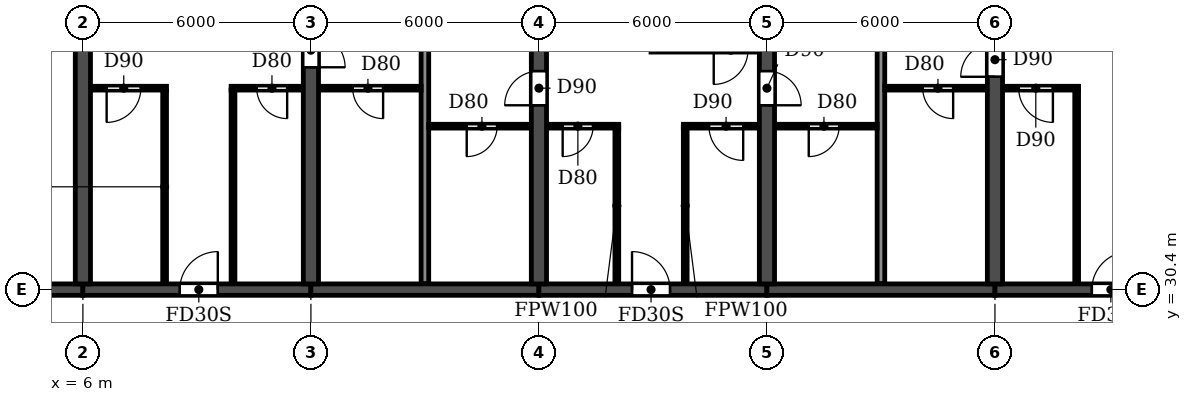
"""IFC4 building model, lengths in metres.
Left out: names, types, materials, properties, quantities, classifications, styles, units other than length and angle.
Written with IfcOpenShell. Run it as: python <this file> out.ifc"""

import sys

from ifc_helpers import new_model, si_unit, direction, frame, frame_2d, origin, place, context, subcontext, project, spatial, rectangle, extrude, element, fill, save


model = new_model("IFC4")
c1 = context("Model", 3, precision=1e-05, world=origin(), true_north=direction((0.0, 1.0)))
c2 = subcontext(c1, "Body", "Model", "MODEL_VIEW")
j1 = project(units=[si_unit("LENGTHUNIT", "METRE"), si_unit("PLANEANGLEUNIT", "RADIAN")], contexts=[c1])
p1 = place(None, origin())
s1 = spatial("IfcSite", under=j1, at=p1, CompositionType="ELEMENT")
p2 = place(p1, origin())
s2 = spatial("IfcBuilding", under=s1, at=p2, CompositionType="ELEMENT")
p3 = place(p2, frame((0.0, 0.0, 23.4)))
s3 = spatial("IfcBuildingStorey", under=s2, at=p3, CompositionType="ELEMENT", Elevation=23.4)
p4 = place(p3, frame((6.0, 30.55, 0.0), z_axis=(0.0, 0.0, 1.0), x_axis=(0.0, 1.0, 0.0)))
e1 = element("IfcWall", 1, at=p4, inside=s3, PredefinedType="SHEAR", context=c2, shape_type="SweptSolid", body=[
    extrude(rectangle(XDim=14.05, YDim=0.4, at=frame_2d((7.025, 0.0))), origin(), (0.0, 0.0, 1.0), 3.05),
])
p5 = place(p3, frame((12.0, 30.55, 0.0), z_axis=(0.0, 0.0, 1.0), x_axis=(0.0, 1.0, 0.0)))
e2 = element("IfcWall", 2, at=p5, inside=s3, PredefinedType="SHEAR", context=c2, shape_type="SweptSolid", body=[
    extrude(rectangle(XDim=14.05, YDim=0.4, at=frame_2d((7.025, 0.0))), origin(), (0.0, 0.0, 1.0), 3.05),
])
p6 = place(p5, frame((5.7, 0.0, 0.0)))
e3 = element("IfcOpeningElement", 3, at=p6, cuts=e2, PredefinedType="OPENING", context=c2, shape_type="SweptSolid", body=[
    extrude(rectangle(XDim=0.9, YDim=2.1, at=frame_2d((0.45, 1.05))), frame((0.0, 0.21, 0.0), z_axis=(0.0, -1.0, 0.0), x_axis=(1.0, 0.0, 0.0)), (0.0, 0.0, 1.0), 0.42),
])
p7 = place(p3, frame((18.0, 30.55, 0.0), z_axis=(0.0, 0.0, 1.0), x_axis=(0.0, 1.0, 0.0)))
e4 = element("IfcWall", 4, at=p7, inside=s3, PredefinedType="SHEAR", context=c2, shape_type="SweptSolid", body=[
    extrude(rectangle(XDim=14.05, YDim=0.4, at=frame_2d((7.025, 0.0))), origin(), (0.0, 0.0, 1.0), 3.05),
])
p8 = place(p7, frame((4.7, 0.0, 0.0)))
e5 = element("IfcOpeningElement", 5, at=p8, cuts=e4, PredefinedType="OPENING", context=c2, shape_type="SweptSolid", body=[
    extrude(rectangle(XDim=0.9, YDim=2.1, at=frame_2d((0.45, 1.05))), frame((0.0, 0.21, 0.0), z_axis=(0.0, -1.0, 0.0), x_axis=(1.0, 0.0, 0.0)), (0.0, 0.0, 1.0), 0.42),
])
p9 = place(p3, frame((24.0, 30.55, 0.0), z_axis=(0.0, 0.0, 1.0), x_axis=(0.0, 1.0, 0.0)))
e6 = element("IfcWall", 6, at=p9, inside=s3, PredefinedType="SHEAR", context=c2, shape_type="SweptSolid", body=[
    extrude(rectangle(XDim=14.05, YDim=0.4, at=frame_2d((7.025, 0.0))), origin(), (0.0, 0.0, 1.0), 3.05),
])
p10 = place(p9, frame((4.7, 0.0, 0.0)))
e7 = element("IfcOpeningElement", 7, at=p10, cuts=e6, PredefinedType="OPENING", context=c2, shape_type="SweptSolid", body=[
    extrude(rectangle(XDim=0.9, YDim=2.1, at=frame_2d((0.45, 1.05))), frame((0.0, 0.21, 0.0), z_axis=(0.0, -1.0, 0.0), x_axis=(1.0, 0.0, 0.0)), (0.0, 0.0, 1.0), 0.42),
])
p11 = place(p3, frame((30.0, 30.55, 0.0), z_axis=(0.0, 0.0, 1.0), x_axis=(0.0, 1.0, 0.0)))
e8 = element("IfcWall", 8, at=p11, inside=s3, PredefinedType="SHEAR", context=c2, shape_type="SweptSolid", body=[
    extrude(rectangle(XDim=14.05, YDim=0.4, at=frame_2d((7.025, 0.0))), origin(), (0.0, 0.0, 1.0), 3.05),
])
p12 = place(p11, frame((5.45, 0.0, 0.0)))
e9 = element("IfcOpeningElement", 9, at=p12, cuts=e8, PredefinedType="OPENING", context=c2, shape_type="SweptSolid", body=[
    extrude(rectangle(XDim=0.9, YDim=2.1, at=frame_2d((0.45, 1.05))), frame((0.0, 0.21, 0.0), z_axis=(0.0, -1.0, 0.0), x_axis=(1.0, 0.0, 0.0)), (0.0, 0.0, 1.0), 0.42),
])
p13 = place(p3, frame((0.2, 30.4, 0.0), z_axis=(0.0, 0.0, 1.0), x_axis=(1.0, 0.0, 0.0)))
e10 = element("IfcWall", 10, at=p13, inside=s3, PredefinedType="SHEAR", context=c2, shape_type="SweptSolid", body=[
    extrude(rectangle(XDim=5.8, YDim=0.3, at=frame_2d((2.9, 0.0))), origin(), (0.0, 0.0, 1.0), 2.45),
])
p14 = place(p13, frame((2.3, 0.0, 0.0)))
e11 = element("IfcOpeningElement", 11, at=p14, cuts=e10, PredefinedType="OPENING", context=c2, shape_type="SweptSolid", body=[
    extrude(rectangle(XDim=1.0, YDim=2.1, at=frame_2d((0.5, 1.05))), frame((0.0, 0.16, 0.0), z_axis=(0.0, -1.0, 0.0), x_axis=(1.0, 0.0, 0.0)), (0.0, 0.0, 1.0), 0.32),
])
p15 = place(p3, frame((6.0, 30.4, 0.0), z_axis=(0.0, 0.0, 1.0), x_axis=(1.0, 0.0, 0.0)))
e12 = element("IfcWall", 12, at=p15, inside=s3, PredefinedType="SHEAR", context=c2, shape_type="SweptSolid", body=[
    extrude(rectangle(XDim=6.0, YDim=0.3, at=frame_2d((3.0, 0.0))), origin(), (0.0, 0.0, 1.0), 2.45),
])
p16 = place(p15, frame((2.55, 0.0, 0.0)))
e13 = element("IfcOpeningElement", 13, at=p16, cuts=e12, PredefinedType="OPENING", context=c2, shape_type="SweptSolid", body=[
    extrude(rectangle(XDim=1.0, YDim=2.1, at=frame_2d((0.5, 1.05))), frame((0.0, 0.16, 0.0), z_axis=(0.0, -1.0, 0.0), x_axis=(1.0, 0.0, 0.0)), (0.0, 0.0, 1.0), 0.32),
])
p17 = place(p3, frame((12.0, 30.4, 0.0), z_axis=(0.0, 0.0, 1.0), x_axis=(1.0, 0.0, 0.0)))
e14 = element("IfcWall", 14, at=p17, inside=s3, PredefinedType="SHEAR", context=c2, shape_type="SweptSolid", body=[
    extrude(rectangle(XDim=6.0, YDim=0.3, at=frame_2d((3.0, 0.0))), origin(), (0.0, 0.0, 1.0), 2.45),
])
p18 = place(p3, frame((18.0, 30.4, 0.0), z_axis=(0.0, 0.0, 1.0), x_axis=(1.0, 0.0, 0.0)))
e15 = element("IfcWall", 15, at=p18, inside=s3, PredefinedType="SHEAR", context=c2, shape_type="SweptSolid", body=[
    extrude(rectangle(XDim=6.0, YDim=0.3, at=frame_2d((3.0, 0.0))), origin(), (0.0, 0.0, 1.0), 2.45),
])
p19 = place(p18, frame((2.45, 0.0, 0.0)))
e16 = element("IfcOpeningElement", 16, at=p19, cuts=e15, PredefinedType="OPENING", context=c2, shape_type="SweptSolid", body=[
    extrude(rectangle(XDim=1.0, YDim=2.1, at=frame_2d((0.5, 1.05))), frame((0.0, 0.16, 0.0), z_axis=(0.0, -1.0, 0.0), x_axis=(1.0, 0.0, 0.0)), (0.0, 0.0, 1.0), 0.32),
])
p20 = place(p3, frame((24.0, 30.4, 0.0), z_axis=(0.0, 0.0, 1.0), x_axis=(1.0, 0.0, 0.0)))
e17 = element("IfcWall", 17, at=p20, inside=s3, PredefinedType="SHEAR", context=c2, shape_type="SweptSolid", body=[
    extrude(rectangle(XDim=6.0, YDim=0.3, at=frame_2d((3.0, 0.0))), origin(), (0.0, 0.0, 1.0), 2.45),
])
p21 = place(p3, frame((30.0, 30.4, 0.0), z_axis=(0.0, 0.0, 1.0), x_axis=(1.0, 0.0, 0.0)))
e18 = element("IfcWall", 18, at=p21, inside=s3, PredefinedType="SHEAR", context=c2, shape_type="SweptSolid", body=[
    extrude(rectangle(XDim=6.0, YDim=0.3, at=frame_2d((3.0, 0.0))), origin(), (0.0, 0.0, 1.0), 2.45),
])
p22 = place(p21, frame((2.55, 0.0, 0.0)))
e19 = element("IfcOpeningElement", 19, at=p22, cuts=e18, PredefinedType="OPENING", context=c2, shape_type="SweptSolid", body=[
    extrude(rectangle(XDim=1.0, YDim=2.1, at=frame_2d((0.5, 1.05))), frame((0.0, 0.16, 0.0), z_axis=(0.0, -1.0, 0.0), x_axis=(1.0, 0.0, 0.0)), (0.0, 0.0, 1.0), 0.32),
])
for number, where, z_axis, x_axis in (
    (20, (15.0, 30.56, 0.0), (0.0, 0.0, 1.0), (0.0, 1.0, 0.0)),
    (21, (27.0, 30.56, 0.0), (0.0, 0.0, 1.0), (0.0, 1.0, 0.0)),
):
    element("IfcWall", number, at=place(p3, frame(where, z_axis=z_axis, x_axis=x_axis)), inside=s3, PredefinedType="PARTITIONING", context=c2, shape_type="SweptSolid", body=[
        extrude(rectangle(XDim=14.18, YDim=0.2, at=frame_2d((7.09, 0.0))), origin(), (0.0, 0.0, 1.0), 3.05),
    ])
p23 = place(p3, frame((15.1, 34.7, 0.0), z_axis=(0.0, 0.0, 1.0), x_axis=(1.0, 0.0, 0.0)))
e22 = element("IfcWall", 22, at=p23, inside=s3, PredefinedType="PARTITIONING", context=c2, shape_type="SweptSolid", body=[
    extrude(rectangle(XDim=2.69, YDim=0.1, at=frame_2d((1.345, 0.0))), origin(), (0.0, 0.0, 1.0), 3.05),
])
p24 = place(p23, frame((1.0, 0.0, 0.0)))
e23 = element("IfcOpeningElement", 23, at=p24, cuts=e22, PredefinedType="OPENING", context=c2, shape_type="SweptSolid", body=[
    extrude(rectangle(XDim=0.8, YDim=2.1, at=frame_2d((0.4, 1.05))), frame((0.0, 0.06, 0.0), z_axis=(0.0, -1.0, 0.0), x_axis=(1.0, 0.0, 0.0)), (0.0, 0.0, 1.0), 0.12),
])
p25 = place(p3, frame((18.21, 34.7, 0.0), z_axis=(0.0, 0.0, 1.0), x_axis=(1.0, 0.0, 0.0)))
e24 = element("IfcWall", 24, at=p25, inside=s3, PredefinedType="PARTITIONING", context=c2, shape_type="SweptSolid", body=[
    extrude(rectangle(XDim=1.89, YDim=0.1, at=frame_2d((0.945, 0.0))), origin(), (0.0, 0.0, 1.0), 3.05),
])
p26 = place(p25, frame((0.415, 0.0, 0.0)))
e25 = element("IfcOpeningElement", 25, at=p26, cuts=e24, PredefinedType="OPENING", context=c2, shape_type="SweptSolid", body=[
    extrude(rectangle(XDim=0.8, YDim=2.1, at=frame_2d((0.4, 1.05))), frame((0.0, 0.06, 0.0), z_axis=(0.0, -1.0, 0.0), x_axis=(1.0, 0.0, 0.0)), (0.0, 0.0, 1.0), 0.12),
])
p27 = place(p3, frame((21.8, 34.7, 0.0), z_axis=(0.0, 0.0, 1.0), x_axis=(1.0, 0.0, 0.0)))
e26 = element("IfcWall", 26, at=p27, inside=s3, PredefinedType="PARTITIONING", context=c2, shape_type="SweptSolid", body=[
    extrude(rectangle(XDim=1.99, YDim=0.1, at=frame_2d((0.995, 0.0))), origin(), (0.0, 0.0, 1.0), 3.05),
])
p28 = place(p27, frame((0.675, 0.0, 0.0)))
e27 = element("IfcOpeningElement", 27, at=p28, cuts=e26, PredefinedType="OPENING", context=c2, shape_type="SweptSolid", body=[
    extrude(rectangle(XDim=0.9, YDim=2.1, at=frame_2d((0.45, 1.05))), frame((0.0, 0.06, 0.0), z_axis=(0.0, -1.0, 0.0), x_axis=(1.0, 0.0, 0.0)), (0.0, 0.0, 1.0), 0.12),
])
p29 = place(p3, frame((24.21, 34.7, 0.0), z_axis=(0.0, 0.0, 1.0), x_axis=(1.0, 0.0, 0.0)))
e28 = element("IfcWall", 28, at=p29, inside=s3, PredefinedType="PARTITIONING", context=c2, shape_type="SweptSolid", body=[
    extrude(rectangle(XDim=2.69, YDim=0.1, at=frame_2d((1.345, 0.0))), origin(), (0.0, 0.0, 1.0), 3.05),
])
p30 = place(p29, frame((0.89, 0.0, 0.0)))
e29 = element("IfcOpeningElement", 29, at=p30, cuts=e28, PredefinedType="OPENING", context=c2, shape_type="SweptSolid", body=[
    extrude(rectangle(XDim=0.8, YDim=2.1, at=frame_2d((0.4, 1.05))), frame((0.0, 0.06, 0.0), z_axis=(0.0, -1.0, 0.0), x_axis=(1.0, 0.0, 0.0)), (0.0, 0.0, 1.0), 0.12),
])
p31 = place(p3, frame((6.21, 35.7, 0.0), z_axis=(0.0, 0.0, 1.0), x_axis=(1.0, 0.0, 0.0)))
e30 = element("IfcWall", 30, at=p31, inside=s3, PredefinedType="PARTITIONING", context=c2, shape_type="SweptSolid", body=[
    extrude(rectangle(XDim=1.99, YDim=0.1, at=frame_2d((0.995, 0.0))), origin(), (0.0, 0.0, 1.0), 3.05),
])
p32 = place(p31, frame((0.415, 0.0, 0.0)))
e31 = element("IfcOpeningElement", 31, at=p32, cuts=e30, PredefinedType="OPENING", context=c2, shape_type="SweptSolid", body=[
    extrude(rectangle(XDim=0.9, YDim=2.1, at=frame_2d((0.45, 1.05))), frame((0.0, 0.06, 0.0), z_axis=(0.0, -1.0, 0.0), x_axis=(1.0, 0.0, 0.0)), (0.0, 0.0, 1.0), 0.12),
])
p33 = place(p3, frame((9.9, 35.7, 0.0), z_axis=(0.0, 0.0, 1.0), x_axis=(1.0, 0.0, 0.0)))
e32 = element("IfcWall", 32, at=p33, inside=s3, PredefinedType="PARTITIONING", context=c2, shape_type="SweptSolid", body=[
    extrude(rectangle(XDim=1.89, YDim=0.1, at=frame_2d((0.945, 0.0))), origin(), (0.0, 0.0, 1.0), 3.05),
])
p34 = place(p33, frame((0.675, 0.0, 0.0)))
e33 = element("IfcOpeningElement", 33, at=p34, cuts=e32, PredefinedType="OPENING", context=c2, shape_type="SweptSolid", body=[
    extrude(rectangle(XDim=0.8, YDim=2.1, at=frame_2d((0.4, 1.05))), frame((0.0, 0.06, 0.0), z_axis=(0.0, -1.0, 0.0), x_axis=(1.0, 0.0, 0.0)), (0.0, 0.0, 1.0), 0.12),
])
p35 = place(p3, frame((12.21, 35.7, 0.0), z_axis=(0.0, 0.0, 1.0), x_axis=(1.0, 0.0, 0.0)))
e34 = element("IfcWall", 34, at=p35, inside=s3, PredefinedType="PARTITIONING", context=c2, shape_type="SweptSolid", body=[
    extrude(rectangle(XDim=2.69, YDim=0.1, at=frame_2d((1.345, 0.0))), origin(), (0.0, 0.0, 1.0), 3.05),
])
p36 = place(p35, frame((0.89, 0.0, 0.0)))
e35 = element("IfcOpeningElement", 35, at=p36, cuts=e34, PredefinedType="OPENING", context=c2, shape_type="SweptSolid", body=[
    extrude(rectangle(XDim=0.8, YDim=2.1, at=frame_2d((0.4, 1.05))), frame((0.0, 0.06, 0.0), z_axis=(0.0, -1.0, 0.0), x_axis=(1.0, 0.0, 0.0)), (0.0, 0.0, 1.0), 0.12),
])
p37 = place(p3, frame((27.1, 35.7, 0.0), z_axis=(0.0, 0.0, 1.0), x_axis=(1.0, 0.0, 0.0)))
e36 = element("IfcWall", 36, at=p37, inside=s3, PredefinedType="PARTITIONING", context=c2, shape_type="SweptSolid", body=[
    extrude(rectangle(XDim=2.69, YDim=0.1, at=frame_2d((1.345, 0.0))), origin(), (0.0, 0.0, 1.0), 3.05),
])
p38 = place(p37, frame((1.0, 0.0, 0.0)))
e37 = element("IfcOpeningElement", 37, at=p38, cuts=e36, PredefinedType="OPENING", context=c2, shape_type="SweptSolid", body=[
    extrude(rectangle(XDim=0.8, YDim=2.1, at=frame_2d((0.4, 1.05))), frame((0.0, 0.06, 0.0), z_axis=(0.0, -1.0, 0.0), x_axis=(1.0, 0.0, 0.0)), (0.0, 0.0, 1.0), 0.12),
])
p39 = place(p3, frame((30.21, 35.7, 0.0), z_axis=(0.0, 0.0, 1.0), x_axis=(1.0, 0.0, 0.0)))
e38 = element("IfcWall", 38, at=p39, inside=s3, PredefinedType="PARTITIONING", context=c2, shape_type="SweptSolid", body=[
    extrude(rectangle(XDim=1.99, YDim=0.1, at=frame_2d((0.995, 0.0))), origin(), (0.0, 0.0, 1.0), 3.05),
])
p40 = place(p39, frame((0.415, 0.0, 0.0)))
e39 = element("IfcOpeningElement", 39, at=p40, cuts=e38, PredefinedType="OPENING", context=c2, shape_type="SweptSolid", body=[
    extrude(rectangle(XDim=0.9, YDim=2.1, at=frame_2d((0.45, 1.05))), frame((0.0, 0.06, 0.0), z_axis=(0.0, -1.0, 0.0), x_axis=(1.0, 0.0, 0.0)), (0.0, 0.0, 1.0), 0.12),
])
for number, where, z_axis, x_axis in (
    (40, (8.15, 30.56, 0.0), (0.0, 0.0, 1.0), (0.0, 1.0, 0.0)),
    (41, (9.95, 30.56, 0.0), (0.0, 0.0, 1.0), (0.0, 1.0, 0.0)),
):
    element("IfcWall", number, at=place(p3, frame(where, z_axis=z_axis, x_axis=x_axis)), inside=s3, PredefinedType="PARTITIONING", context=c2, shape_type="SweptSolid", body=[
        extrude(rectangle(XDim=5.09, YDim=0.1, at=frame_2d((2.545, 0.0))), origin(), (0.0, 0.0, 1.0), 3.05),
    ])
for number, where, z_axis, x_axis in (
    (42, (20.05, 30.56, 0.0), (0.0, 0.0, 1.0), (0.0, 1.0, 0.0)),
    (43, (21.85, 30.56, 0.0), (0.0, 0.0, 1.0), (0.0, 1.0, 0.0)),
):
    element("IfcWall", number, at=place(p3, frame(where, z_axis=z_axis, x_axis=x_axis)), inside=s3, PredefinedType="PARTITIONING", context=c2, shape_type="SweptSolid", body=[
        extrude(rectangle(XDim=4.09, YDim=0.1, at=frame_2d((2.045, 0.0))), origin(), (0.0, 0.0, 1.0), 3.05),
    ])
p41 = place(p3, frame((32.15, 30.56, 0.0), z_axis=(0.0, 0.0, 1.0), x_axis=(0.0, 1.0, 0.0)))
e44 = element("IfcWall", 44, at=p41, inside=s3, PredefinedType="PARTITIONING", context=c2, shape_type="SweptSolid", body=[
    extrude(rectangle(XDim=5.09, YDim=0.1, at=frame_2d((2.545, 0.0))), origin(), (0.0, 0.0, 1.0), 3.05),
])
p42 = place(p36, frame((0.8, 0.0, 0.0), z_axis=(0.0, 0.0, 1.0), x_axis=(-1.0, 0.0, 0.0)))
e45 = element("IfcDoor", 45, at=p42, inside=s3, OperationType="SINGLE_SWING_LEFT", PredefinedType="DOOR", context=c2, shape_type="SweptSolid", body=[
    extrude(rectangle(XDim=0.8, YDim=2.1, at=frame_2d((0.4, 1.05))), frame((0.0, 0.025, 0.0), z_axis=(0.0, -1.0, 0.0), x_axis=(1.0, 0.0, 0.0)), (0.0, 0.0, 1.0), 0.05),
])
fill(e35, e45)
p43 = place(p32, frame((0.9, 0.0, 0.0), z_axis=(0.0, 0.0, 1.0), x_axis=(-1.0, 0.0, 0.0)))
e46 = element("IfcDoor", 46, at=p43, inside=s3, OperationType="SINGLE_SWING_RIGHT", PredefinedType="DOOR", context=c2, shape_type="SweptSolid", body=[
    extrude(rectangle(XDim=0.9, YDim=2.1, at=frame_2d((0.45, 1.05))), frame((0.0, 0.025, 0.0), z_axis=(0.0, -1.0, 0.0), x_axis=(1.0, 0.0, 0.0)), (0.0, 0.0, 1.0), 0.05),
])
fill(e31, e46)
p44 = place(p16, origin())
e47 = element("IfcDoor", 47, at=p44, inside=s3, OperationType="SINGLE_SWING_RIGHT", PredefinedType="DOOR", context=c2, shape_type="SweptSolid", body=[
    extrude(rectangle(XDim=1.0, YDim=2.1, at=frame_2d((0.5, 1.05))), frame((0.0, 0.025, 0.0), z_axis=(0.0, -1.0, 0.0), x_axis=(1.0, 0.0, 0.0)), (0.0, 0.0, 1.0), 0.05),
])
fill(e13, e47)
p45 = place(p34, frame((0.8, 0.0, 0.0), z_axis=(0.0, 0.0, 1.0), x_axis=(-1.0, 0.0, 0.0)))
e48 = element("IfcDoor", 48, at=p45, inside=s3, OperationType="SINGLE_SWING_LEFT", PredefinedType="DOOR", context=c2, shape_type="SweptSolid", body=[
    extrude(rectangle(XDim=0.8, YDim=2.1, at=frame_2d((0.4, 1.05))), frame((0.0, 0.025, 0.0), z_axis=(0.0, -1.0, 0.0), x_axis=(1.0, 0.0, 0.0)), (0.0, 0.0, 1.0), 0.05),
])
fill(e33, e48)
p46 = place(p6, frame((0.9, 0.0, 0.0), z_axis=(0.0, 0.0, 1.0), x_axis=(-1.0, 0.0, 0.0)))
e49 = element("IfcDoor", 49, at=p46, inside=s3, OperationType="SINGLE_SWING_RIGHT", PredefinedType="DOOR", context=c2, shape_type="SweptSolid", body=[
    extrude(rectangle(XDim=0.9, YDim=2.1, at=frame_2d((0.45, 1.05))), frame((0.0, 0.025, 0.0), z_axis=(0.0, -1.0, 0.0), x_axis=(1.0, 0.0, 0.0)), (0.0, 0.0, 1.0), 0.05),
])
fill(e3, e49)
p47 = place(p24, frame((0.8, 0.0, 0.0), z_axis=(0.0, 0.0, 1.0), x_axis=(-1.0, 0.0, 0.0)))
e50 = element("IfcDoor", 50, at=p47, inside=s3, OperationType="SINGLE_SWING_RIGHT", PredefinedType="DOOR", context=c2, shape_type="SweptSolid", body=[
    extrude(rectangle(XDim=0.8, YDim=2.1, at=frame_2d((0.4, 1.05))), frame((0.0, 0.025, 0.0), z_axis=(0.0, -1.0, 0.0), x_axis=(1.0, 0.0, 0.0)), (0.0, 0.0, 1.0), 0.05),
])
fill(e23, e50)
p48 = place(p30, frame((0.8, 0.0, 0.0), z_axis=(0.0, 0.0, 1.0), x_axis=(-1.0, 0.0, 0.0)))
e51 = element("IfcDoor", 51, at=p48, inside=s3, OperationType="SINGLE_SWING_RIGHT", PredefinedType="DOOR", context=c2, shape_type="SweptSolid", body=[
    extrude(rectangle(XDim=0.8, YDim=2.1, at=frame_2d((0.4, 1.05))), frame((0.0, 0.025, 0.0), z_axis=(0.0, -1.0, 0.0), x_axis=(1.0, 0.0, 0.0)), (0.0, 0.0, 1.0), 0.05),
])
fill(e29, e51)
p49 = place(p8, origin())
e52 = element("IfcDoor", 52, at=p49, inside=s3, OperationType="SINGLE_SWING_LEFT", PredefinedType="DOOR", context=c2, shape_type="SweptSolid", body=[
    extrude(rectangle(XDim=0.9, YDim=2.1, at=frame_2d((0.45, 1.05))), frame((0.0, 0.025, 0.0), z_axis=(0.0, -1.0, 0.0), x_axis=(1.0, 0.0, 0.0)), (0.0, 0.0, 1.0), 0.05),
])
fill(e5, e52)
p50 = place(p26, frame((0.8, 0.0, 0.0), z_axis=(0.0, 0.0, 1.0), x_axis=(-1.0, 0.0, 0.0)))
e53 = element("IfcDoor", 53, at=p50, inside=s3, OperationType="SINGLE_SWING_RIGHT", PredefinedType="DOOR", context=c2, shape_type="SweptSolid", body=[
    extrude(rectangle(XDim=0.8, YDim=2.1, at=frame_2d((0.4, 1.05))), frame((0.0, 0.025, 0.0), z_axis=(0.0, -1.0, 0.0), x_axis=(1.0, 0.0, 0.0)), (0.0, 0.0, 1.0), 0.05),
])
fill(e25, e53)
p51 = place(p19, origin())
e54 = element("IfcDoor", 54, at=p51, inside=s3, OperationType="SINGLE_SWING_LEFT", PredefinedType="DOOR", context=c2, shape_type="SweptSolid", body=[
    extrude(rectangle(XDim=1.0, YDim=2.1, at=frame_2d((0.5, 1.05))), frame((0.0, 0.025, 0.0), z_axis=(0.0, -1.0, 0.0), x_axis=(1.0, 0.0, 0.0)), (0.0, 0.0, 1.0), 0.05),
])
fill(e16, e54)
p52 = place(p28, frame((0.9, 0.0, 0.0), z_axis=(0.0, 0.0, 1.0), x_axis=(-1.0, 0.0, 0.0)))
e55 = element("IfcDoor", 55, at=p52, inside=s3, OperationType="SINGLE_SWING_LEFT", PredefinedType="DOOR", context=c2, shape_type="SweptSolid", body=[
    extrude(rectangle(XDim=0.9, YDim=2.1, at=frame_2d((0.45, 1.05))), frame((0.0, 0.025, 0.0), z_axis=(0.0, -1.0, 0.0), x_axis=(1.0, 0.0, 0.0)), (0.0, 0.0, 1.0), 0.05),
])
fill(e27, e55)
p53 = place(p10, frame((0.9, 0.0, 0.0), z_axis=(0.0, 0.0, 1.0), x_axis=(-1.0, 0.0, 0.0)))
e56 = element("IfcDoor", 56, at=p53, inside=s3, OperationType="SINGLE_SWING_RIGHT", PredefinedType="DOOR", context=c2, shape_type="SweptSolid", body=[
    extrude(rectangle(XDim=0.9, YDim=2.1, at=frame_2d((0.45, 1.05))), frame((0.0, 0.025, 0.0), z_axis=(0.0, -1.0, 0.0), x_axis=(1.0, 0.0, 0.0)), (0.0, 0.0, 1.0), 0.05),
])
fill(e7, e56)
p54 = place(p38, frame((0.8, 0.0, 0.0), z_axis=(0.0, 0.0, 1.0), x_axis=(-1.0, 0.0, 0.0)))
e57 = element("IfcDoor", 57, at=p54, inside=s3, OperationType="SINGLE_SWING_LEFT", PredefinedType="DOOR", context=c2, shape_type="SweptSolid", body=[
    extrude(rectangle(XDim=0.8, YDim=2.1, at=frame_2d((0.4, 1.05))), frame((0.0, 0.025, 0.0), z_axis=(0.0, -1.0, 0.0), x_axis=(1.0, 0.0, 0.0)), (0.0, 0.0, 1.0), 0.05),
])
fill(e37, e57)
p55 = place(p12, origin())
e58 = element("IfcDoor", 58, at=p55, inside=s3, OperationType="SINGLE_SWING_LEFT", PredefinedType="DOOR", context=c2, shape_type="SweptSolid", body=[
    extrude(rectangle(XDim=0.9, YDim=2.1, at=frame_2d((0.45, 1.05))), frame((0.0, 0.025, 0.0), z_axis=(0.0, -1.0, 0.0), x_axis=(1.0, 0.0, 0.0)), (0.0, 0.0, 1.0), 0.05),
])
fill(e9, e58)
p56 = place(p40, frame((0.9, 0.0, 0.0), z_axis=(0.0, 0.0, 1.0), x_axis=(-1.0, 0.0, 0.0)))
e59 = element("IfcDoor", 59, at=p56, inside=s3, OperationType="SINGLE_SWING_LEFT", PredefinedType="DOOR", context=c2, shape_type="SweptSolid", body=[
    extrude(rectangle(XDim=0.9, YDim=2.1, at=frame_2d((0.45, 1.05))), frame((0.0, 0.025, 0.0), z_axis=(0.0, -1.0, 0.0), x_axis=(1.0, 0.0, 0.0)), (0.0, 0.0, 1.0), 0.05),
])
fill(e39, e59)
p57 = place(p22, origin())
e60 = element("IfcDoor", 60, at=p57, inside=s3, OperationType="SINGLE_SWING_RIGHT", PredefinedType="DOOR", context=c2, shape_type="SweptSolid", body=[
    extrude(rectangle(XDim=1.0, YDim=2.1, at=frame_2d((0.5, 1.05))), frame((0.0, 0.025, 0.0), z_axis=(0.0, -1.0, 0.0), x_axis=(1.0, 0.0, 0.0)), (0.0, 0.0, 1.0), 0.05),
])
fill(e19, e60)
save(model, sys.argv[1])
